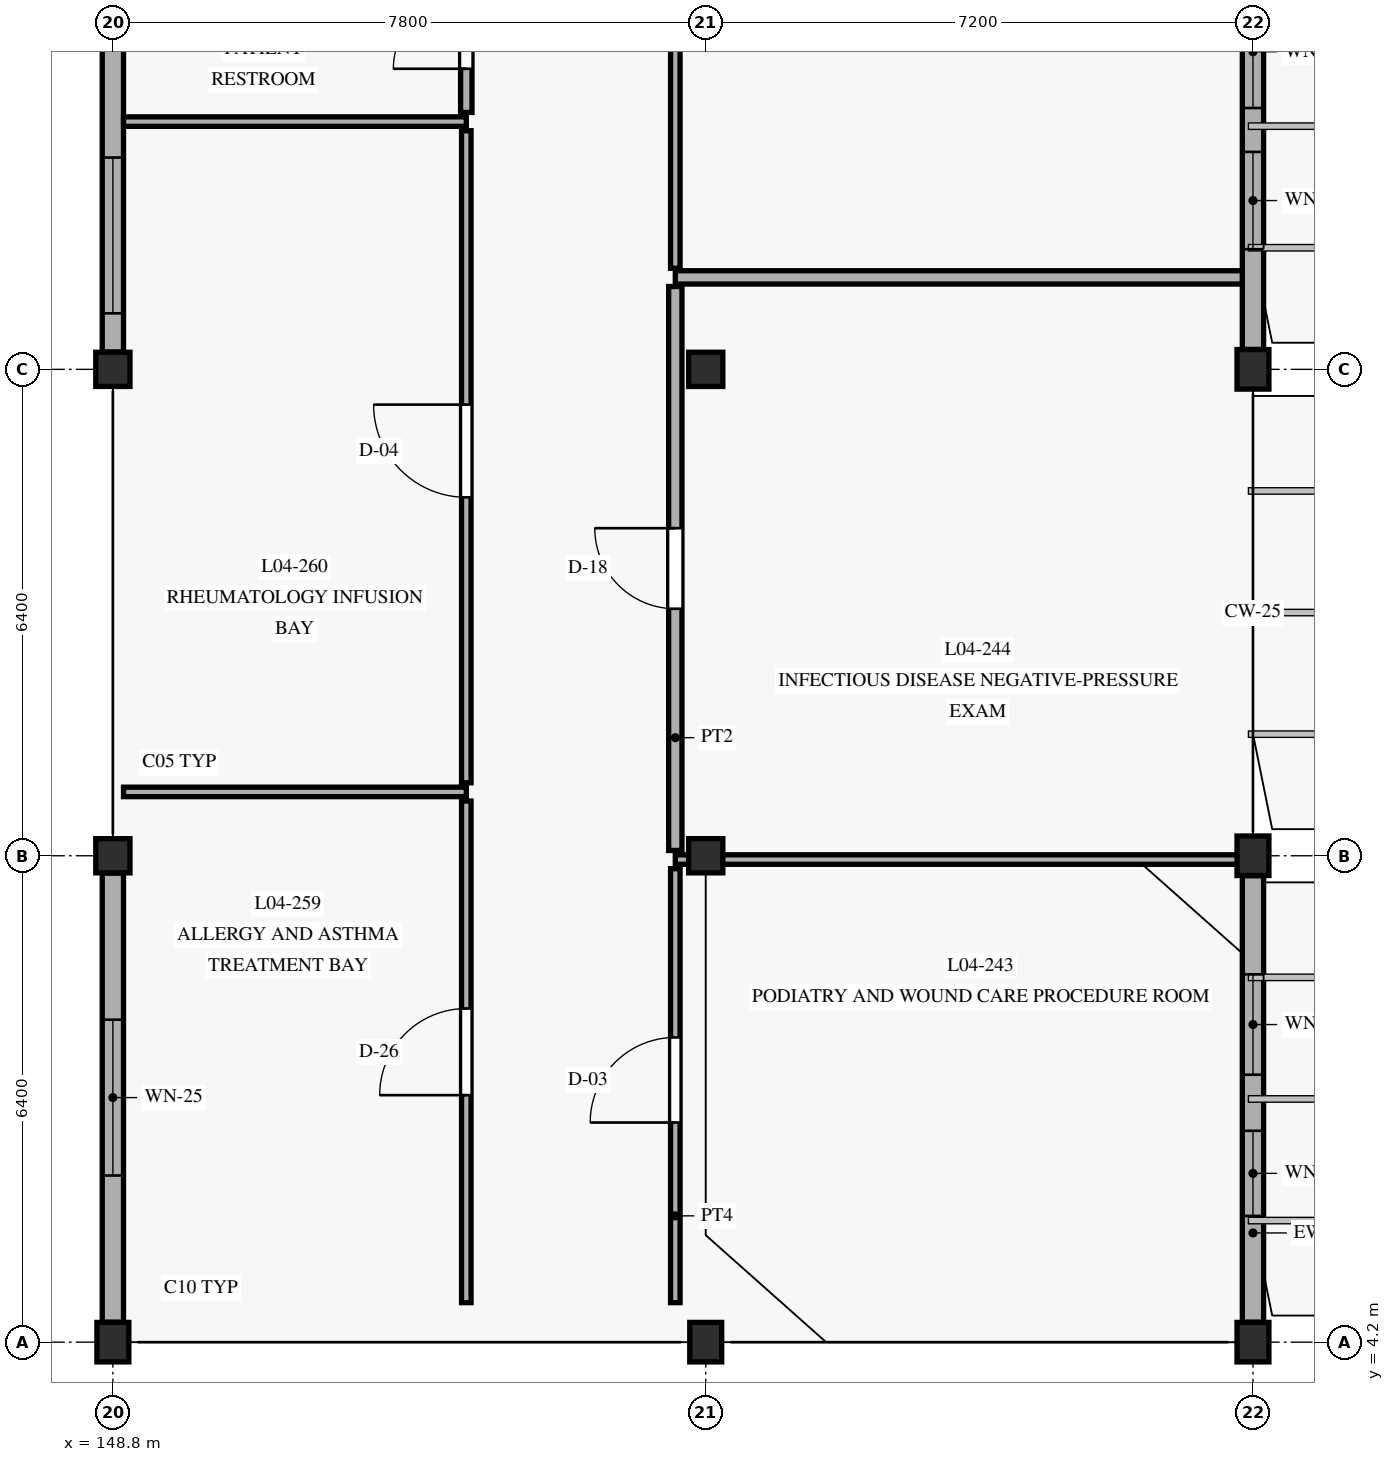
"""IFC4 building model, lengths in metres.
Left out: names, types, materials, properties, quantities, classifications, styles, units other than length and angle.
Written with IfcOpenShell. Run it as: python <this file> out.ifc"""

import sys

from ifc_helpers import new_model, si_unit, direction, frame, frame_2d, origin, origin_with_axes, origin_2d, place, context, subcontext, project, spatial, rectangle, extrude, element, fill, save


model = new_model("IFC4")
c1 = context("Model", 3, precision=1e-05, world=origin(), true_north=direction((0.0, 1.0)))
c2 = subcontext(c1, "Body", "Model", "MODEL_VIEW")
j1 = project(units=[si_unit("LENGTHUNIT", "METRE"), si_unit("PLANEANGLEUNIT", "RADIAN")], contexts=[c1])
p1 = place(None, origin())
s1 = spatial("IfcSite", under=j1, at=p1, CompositionType="ELEMENT")
p2 = place(p1, origin())
s2 = spatial("IfcBuilding", under=s1, at=p2, CompositionType="ELEMENT")
p3 = place(p2, frame((0.0, 0.0, 13.5)))
s3 = spatial("IfcBuildingStorey", under=s2, at=p3, CompositionType="ELEMENT", Elevation=13.5)
p4 = place(p3, frame((148.8, 4.2, 0.0), z_axis=(0.0, 0.0, 1.0), x_axis=(1.0, 0.0, 0.0)))
e1 = element("IfcColumn", 1, at=p4, inside=s3, PredefinedType="COLUMN", context=c2, shape_type="SweptSolid", body=[
    extrude(rectangle(XDim=0.42, YDim=0.52, at=origin_2d()), origin(), (0.0, 0.0, 1.0), 4.05),
])
for number, where, z_axis, x_axis in (
    (2, (148.8, 10.6, 0.0), (0.0, 0.0, 1.0), (1.0, 0.0, 0.0)),
    (3, (148.8, 17.0, 0.0), (0.0, 0.0, 1.0), (1.0, 0.0, 0.0)),
):
    element("IfcColumn", number, at=place(p3, frame(where, z_axis=z_axis, x_axis=x_axis)), inside=s3, PredefinedType="COLUMN", context=c2, shape_type="SweptSolid", body=[
        extrude(rectangle(XDim=0.45, YDim=0.45, at=origin_2d()), origin(), (0.0, 0.0, 1.0), 4.05),
    ])
p5 = place(p3, frame((156.6, 4.2, 0.0), z_axis=(0.0, 0.0, 1.0), x_axis=(1.0, 0.0, 0.0)))
e4 = element("IfcColumn", 4, at=p5, inside=s3, PredefinedType="COLUMN", context=c2, shape_type="SweptSolid", body=[
    extrude(rectangle(XDim=0.42, YDim=0.52, at=origin_2d()), origin(), (0.0, 0.0, 1.0), 4.05),
])
for number, where, z_axis, x_axis in (
    (5, (156.6, 10.6, 0.0), (0.0, 0.0, 1.0), (1.0, 0.0, 0.0)),
    (6, (156.6, 17.0, 0.0), (0.0, 0.0, 1.0), (1.0, 0.0, 0.0)),
):
    element("IfcColumn", number, at=place(p3, frame(where, z_axis=z_axis, x_axis=x_axis)), inside=s3, PredefinedType="COLUMN", context=c2, shape_type="SweptSolid", body=[
        extrude(rectangle(XDim=0.45, YDim=0.45, at=origin_2d()), origin(), (0.0, 0.0, 1.0), 4.05),
    ])
for number, where, z_axis, x_axis in (
    (7, (163.8, 4.2, 0.0), (0.0, 0.0, 1.0), (1.0, 0.0, 0.0)),
    (8, (163.8, 10.6, 0.0), (0.0, 0.0, 1.0), (1.0, 0.0, 0.0)),
    (9, (163.8, 17.0, 0.0), (0.0, 0.0, 1.0), (1.0, 0.0, 0.0)),
):
    element("IfcColumn", number, at=place(p3, frame(where, z_axis=z_axis, x_axis=x_axis)), inside=s3, PredefinedType="COLUMN", context=c2, shape_type="SweptSolid", body=[
        extrude(rectangle(XDim=0.42, YDim=0.52, at=origin_2d()), origin(), (0.0, 0.0, 1.0), 4.05),
    ])
p6 = place(p3, frame((163.8, 4.462, 0.0), z_axis=(0.0, 0.0, 1.0), x_axis=(0.0, 1.0, 0.0)))
e10 = element("IfcWall", 10, at=p6, inside=s3, PredefinedType="SOLIDWALL", context=c2, shape_type="SweptSolid", body=[
    extrude(rectangle(XDim=5.876, YDim=0.28, at=frame_2d((2.938, 0.0))), origin(), (0.0, 0.0, 1.0), 3.42),
])
p7 = place(p6, frame((1.399, 0.0, 0.88)))
e11 = element("IfcOpeningElement", 11, at=p7, cuts=e10, PredefinedType="OPENING", context=c2, shape_type="SweptSolid", body=[
    extrude(rectangle(XDim=1.12, YDim=1.95, at=frame_2d((0.56, 0.975))), frame((0.0, 0.15, 0.0), z_axis=(0.0, -1.0, 0.0), x_axis=(1.0, 0.0, 0.0)), (0.0, 0.0, 1.0), 0.3),
])
p8 = place(p6, frame((3.257, 0.0, 0.88)))
e12 = element("IfcOpeningElement", 12, at=p8, cuts=e10, PredefinedType="OPENING", context=c2, shape_type="SweptSolid", body=[
    extrude(rectangle(XDim=1.32, YDim=2.15, at=frame_2d((0.66, 1.075))), frame((0.0, 0.15, 0.0), z_axis=(0.0, -1.0, 0.0), x_axis=(1.0, 0.0, 0.0)), (0.0, 0.0, 1.0), 0.3),
])
p9 = place(p3, frame((163.8, 17.262, 0.0), z_axis=(0.0, 0.0, 1.0), x_axis=(0.0, 1.0, 0.0)))
e13 = element("IfcWall", 13, at=p9, inside=s3, PredefinedType="SOLIDWALL", context=c2, shape_type="SweptSolid", body=[
    extrude(rectangle(XDim=5.876, YDim=0.28, at=frame_2d((2.938, 0.0))), origin(), (0.0, 0.0, 1.0), 3.42),
])
p10 = place(p9, frame((1.319, 0.0, 0.88)))
e14 = element("IfcOpeningElement", 14, at=p10, cuts=e13, PredefinedType="OPENING", context=c2, shape_type="SweptSolid", body=[
    extrude(rectangle(XDim=1.28, YDim=1.95, at=frame_2d((0.64, 0.975))), frame((0.0, 0.15, 0.0), z_axis=(0.0, -1.0, 0.0), x_axis=(1.0, 0.0, 0.0)), (0.0, 0.0, 1.0), 0.3),
])
p11 = place(p9, frame((3.177, 0.0, 0.88)))
e15 = element("IfcOpeningElement", 15, at=p11, cuts=e13, PredefinedType="OPENING", context=c2, shape_type="SweptSolid", body=[
    extrude(rectangle(XDim=1.48, YDim=2.15, at=frame_2d((0.74, 1.075))), frame((0.0, 0.15, 0.0), z_axis=(0.0, -1.0, 0.0), x_axis=(1.0, 0.0, 0.0)), (0.0, 0.0, 1.0), 0.3),
])
p12 = place(p3, frame((148.8, 10.373, 0.0), z_axis=(0.0, 0.0, 1.0), x_axis=(0.0, -1.0, 0.0)))
e16 = element("IfcWall", 16, at=p12, inside=s3, PredefinedType="SOLIDWALL", context=c2, shape_type="SweptSolid", body=[
    extrude(rectangle(XDim=5.911, YDim=0.28, at=frame_2d((2.956, 0.0))), origin(), (0.0, 0.0, 1.0), 3.39),
])
p13 = place(p12, frame((1.93, 0.0, 0.8)))
e17 = element("IfcOpeningElement", 17, at=p13, cuts=e16, PredefinedType="OPENING", context=c2, shape_type="SweptSolid", body=[
    extrude(rectangle(XDim=2.05, YDim=1.95, at=frame_2d((1.025, 0.975))), frame((0.0, 0.15, 0.0), z_axis=(0.0, -1.0, 0.0), x_axis=(1.0, 0.0, 0.0)), (0.0, 0.0, 1.0), 0.3),
])
p14 = place(p3, frame((148.8, 23.173, 0.0), z_axis=(0.0, 0.0, 1.0), x_axis=(0.0, -1.0, 0.0)))
e18 = element("IfcWall", 18, at=p14, inside=s3, PredefinedType="SOLIDWALL", context=c2, shape_type="SweptSolid", body=[
    extrude(rectangle(XDim=5.946, YDim=0.28, at=frame_2d((2.973, 0.0))), origin(), (0.0, 0.0, 1.0), 3.39),
])
p15 = place(p14, frame((3.386, 0.0, 0.8)))
e19 = element("IfcOpeningElement", 19, at=p15, cuts=e18, PredefinedType="OPENING", context=c2, shape_type="SweptSolid", body=[
    extrude(rectangle(XDim=2.05, YDim=1.95, at=frame_2d((1.025, 0.975))), frame((0.0, 0.15, 0.0), z_axis=(0.0, -1.0, 0.0), x_axis=(1.0, 0.0, 0.0)), (0.0, 0.0, 1.0), 0.3),
])
p16 = place(p3, frame((156.2, 4.72, 0.0), z_axis=(0.0, 0.0, 1.0), x_axis=(0.0, 1.0, 0.0)))
e20 = element("IfcWall", 20, at=p16, inside=s3, PredefinedType="PARTITIONING", context=c2, shape_type="SweptSolid", body=[
    extrude(rectangle(XDim=5.71, YDim=0.125, at=frame_2d((2.855, 0.0))), origin(), (0.0, 0.0, 1.0), 3.365),
])
p17 = place(p16, frame((2.37, 0.0, 0.0)))
e21 = element("IfcOpeningElement", 21, at=p17, cuts=e20, PredefinedType="OPENING", context=c2, shape_type="SweptSolid", body=[
    extrude(rectangle(XDim=1.12, YDim=2.2, at=frame_2d((0.56, 1.1))), frame((0.0, 0.073, 0.0), z_axis=(0.0, -1.0, 0.0), x_axis=(1.0, 0.0, 0.0)), (0.0, 0.0, 1.0), 0.145),
])
p18 = place(p3, frame((156.2, 10.55, 0.0), z_axis=(0.0, 0.0, 1.0), x_axis=(1.0, 0.0, 0.0)))
e22 = element("IfcWall", 22, at=p18, inside=s3, PredefinedType="PARTITIONING", context=c2, shape_type="SweptSolid", body=[
    extrude(rectangle(XDim=7.46, YDim=0.125, at=frame_2d((3.73, 0.0))), origin(), (0.0, 0.0, 1.0), 3.365),
])
p19 = place(p3, frame((156.2, 10.67, 0.0), z_axis=(0.0, 0.0, 1.0), x_axis=(0.0, 1.0, 0.0)))
e23 = element("IfcWall", 23, at=p19, inside=s3, PredefinedType="PARTITIONING", context=c2, shape_type="SweptSolid", body=[
    extrude(rectangle(XDim=7.42, YDim=0.175, at=frame_2d((3.71, 0.0))), origin(), (0.0, 0.0, 1.0), 3.365),
])
p20 = place(p19, frame((3.18, 0.0, 0.0)))
e24 = element("IfcOpeningElement", 24, at=p20, cuts=e23, PredefinedType="OPENING", context=c2, shape_type="SweptSolid", body=[
    extrude(rectangle(XDim=1.06, YDim=2.2, at=frame_2d((0.53, 1.1))), frame((0.0, 0.098, 0.0), z_axis=(0.0, -1.0, 0.0), x_axis=(1.0, 0.0, 0.0)), (0.0, 0.0, 1.0), 0.195),
])
p21 = place(p3, frame((156.2, 18.21, 0.0), z_axis=(0.0, 0.0, 1.0), x_axis=(1.0, 0.0, 0.0)))
e25 = element("IfcWall", 25, at=p21, inside=s3, PredefinedType="PARTITIONING", context=c2, shape_type="SweptSolid", body=[
    extrude(rectangle(XDim=7.46, YDim=0.175, at=frame_2d((3.73, 0.0))), origin(), (0.0, 0.0, 1.0), 3.385),
])
p22 = place(p3, frame((156.2, 18.33, 0.0), z_axis=(0.0, 0.0, 1.0), x_axis=(0.0, 1.0, 0.0)))
e26 = element("IfcWall", 26, at=p22, inside=s3, PredefinedType="PARTITIONING", context=c2, shape_type="SweptSolid", body=[
    extrude(rectangle(XDim=8.21, YDim=0.125, at=frame_2d((4.105, 0.0))), origin(), (0.0, 0.0, 1.0), 3.365),
])
p23 = place(p22, frame((3.269, 0.0, 0.0)))
e27 = element("IfcOpeningElement", 27, at=p23, cuts=e26, PredefinedType="OPENING", context=c2, shape_type="SweptSolid", body=[
    extrude(rectangle(XDim=0.92, YDim=2.15, at=frame_2d((0.46, 1.075))), frame((0.0, 0.073, 0.0), z_axis=(0.0, -1.0, 0.0), x_axis=(1.0, 0.0, 0.0)), (0.0, 0.0, 1.0), 0.145),
])
p24 = place(p3, frame((153.45, 4.72, 0.0), z_axis=(0.0, 0.0, 1.0), x_axis=(0.0, 1.0, 0.0)))
e28 = element("IfcWall", 28, at=p24, inside=s3, PredefinedType="PARTITIONING", context=c2, shape_type="SweptSolid", body=[
    extrude(rectangle(XDim=6.6, YDim=0.125, at=frame_2d((3.3, 0.0))), origin(), (0.0, 0.0, 1.0), 3.365),
])
p25 = place(p24, frame((2.73, 0.0, 0.0)))
e29 = element("IfcOpeningElement", 29, at=p25, cuts=e28, PredefinedType="OPENING", context=c2, shape_type="SweptSolid", body=[
    extrude(rectangle(XDim=1.14, YDim=2.22, at=frame_2d((0.57, 1.11))), frame((0.0, 0.073, 0.0), z_axis=(0.0, -1.0, 0.0), x_axis=(1.0, 0.0, 0.0)), (0.0, 0.0, 1.0), 0.145),
])
p26 = place(p3, frame((148.94, 11.44, 0.0), z_axis=(0.0, 0.0, 1.0), x_axis=(1.0, 0.0, 0.0)))
e30 = element("IfcWall", 30, at=p26, inside=s3, PredefinedType="PARTITIONING", context=c2, shape_type="SweptSolid", body=[
    extrude(rectangle(XDim=4.51, YDim=0.125, at=frame_2d((2.255, 0.0))), origin(), (0.0, 0.0, 1.0), 3.385),
])
p27 = place(p3, frame((153.45, 11.56, 0.0), z_axis=(0.0, 0.0, 1.0), x_axis=(0.0, 1.0, 0.0)))
e31 = element("IfcWall", 31, at=p27, inside=s3, PredefinedType="PARTITIONING", context=c2, shape_type="SweptSolid", body=[
    extrude(rectangle(XDim=8.58, YDim=0.125, at=frame_2d((4.29, 0.0))), origin(), (0.0, 0.0, 1.0), 3.365),
])
p28 = place(p27, frame((3.756, 0.0, 0.0)))
e32 = element("IfcOpeningElement", 32, at=p28, cuts=e31, PredefinedType="OPENING", context=c2, shape_type="SweptSolid", body=[
    extrude(rectangle(XDim=1.22, YDim=2.2, at=frame_2d((0.61, 1.1))), frame((0.0, 0.073, 0.0), z_axis=(0.0, -1.0, 0.0), x_axis=(1.0, 0.0, 0.0)), (0.0, 0.0, 1.0), 0.145),
])
p29 = place(p3, frame((148.94, 20.26, 0.0), z_axis=(0.0, 0.0, 1.0), x_axis=(1.0, 0.0, 0.0)))
e33 = element("IfcWall", 33, at=p29, inside=s3, PredefinedType="PARTITIONING", context=c2, shape_type="SweptSolid", body=[
    extrude(rectangle(XDim=4.51, YDim=0.125, at=frame_2d((2.255, 0.0))), origin(), (0.0, 0.0, 1.0), 3.385),
])
p30 = place(p3, frame((153.45, 20.38, 0.0), z_axis=(0.0, 0.0, 1.0), x_axis=(0.0, 1.0, 0.0)))
e34 = element("IfcWall", 34, at=p30, inside=s3, PredefinedType="PARTITIONING", context=c2, shape_type="SweptSolid", body=[
    extrude(rectangle(XDim=2.11, YDim=0.15, at=frame_2d((1.055, 0.0))), origin(), (0.0, 0.0, 1.0), 3.765),
])
p31 = place(p30, frame((0.575, 0.0, 0.0)))
e35 = element("IfcOpeningElement", 35, at=p31, cuts=e34, PredefinedType="OPENING", context=c2, shape_type="SweptSolid", body=[
    extrude(rectangle(XDim=0.96, YDim=2.1, at=frame_2d((0.48, 1.05))), frame((0.0, 0.085, 0.0), z_axis=(0.0, -1.0, 0.0), x_axis=(1.0, 0.0, 0.0)), (0.0, 0.0, 1.0), 0.17),
])
p32 = place(p7, origin_with_axes())
e36 = element("IfcWindow", 36, at=p32, inside=s3, PartitioningType="SINGLE_PANEL", PredefinedType="WINDOW", context=c2, shape_type="SweptSolid", body=[
    extrude(rectangle(XDim=1.12, YDim=1.95, at=frame_2d((0.56, 0.975))), frame((0.0, 0.03, 0.0), z_axis=(0.0, -1.0, 0.0), x_axis=(1.0, 0.0, 0.0)), (0.0, 0.0, 1.0), 0.06),
])
fill(e11, e36)
p33 = place(p8, origin_with_axes())
e37 = element("IfcWindow", 37, at=p33, inside=s3, PartitioningType="SINGLE_PANEL", PredefinedType="WINDOW", context=c2, shape_type="SweptSolid", body=[
    extrude(rectangle(XDim=1.32, YDim=2.15, at=frame_2d((0.66, 1.075))), frame((0.0, 0.03, 0.0), z_axis=(0.0, -1.0, 0.0), x_axis=(1.0, 0.0, 0.0)), (0.0, 0.0, 1.0), 0.06),
])
fill(e12, e37)
p34 = place(p10, origin_with_axes())
e38 = element("IfcWindow", 38, at=p34, inside=s3, PartitioningType="SINGLE_PANEL", PredefinedType="WINDOW", context=c2, shape_type="SweptSolid", body=[
    extrude(rectangle(XDim=1.28, YDim=1.95, at=frame_2d((0.64, 0.975))), frame((0.0, 0.03, 0.0), z_axis=(0.0, -1.0, 0.0), x_axis=(1.0, 0.0, 0.0)), (0.0, 0.0, 1.0), 0.06),
])
fill(e14, e38)
p35 = place(p11, origin_with_axes())
e39 = element("IfcWindow", 39, at=p35, inside=s3, PartitioningType="SINGLE_PANEL", PredefinedType="WINDOW", context=c2, shape_type="SweptSolid", body=[
    extrude(rectangle(XDim=1.48, YDim=2.15, at=frame_2d((0.74, 1.075))), frame((0.0, 0.03, 0.0), z_axis=(0.0, -1.0, 0.0), x_axis=(1.0, 0.0, 0.0)), (0.0, 0.0, 1.0), 0.06),
])
fill(e15, e39)
p36 = place(p13, origin_with_axes())
e40 = element("IfcWindow", 40, at=p36, inside=s3, PartitioningType="SINGLE_PANEL", PredefinedType="WINDOW", context=c2, shape_type="SweptSolid", body=[
    extrude(rectangle(XDim=2.05, YDim=1.95, at=frame_2d((1.025, 0.975))), frame((0.0, 0.03, 0.0), z_axis=(0.0, -1.0, 0.0), x_axis=(1.0, 0.0, 0.0)), (0.0, 0.0, 1.0), 0.06),
])
fill(e17, e40)
p37 = place(p15, origin_with_axes())
e41 = element("IfcWindow", 41, at=p37, inside=s3, PartitioningType="SINGLE_PANEL", PredefinedType="WINDOW", context=c2, shape_type="SweptSolid", body=[
    extrude(rectangle(XDim=2.05, YDim=1.95, at=frame_2d((1.025, 0.975))), frame((0.0, 0.03, 0.0), z_axis=(0.0, -1.0, 0.0), x_axis=(1.0, 0.0, 0.0)), (0.0, 0.0, 1.0), 0.06),
])
fill(e19, e41)
p38 = place(p17, frame((1.12, 0.0, 0.0), z_axis=(0.0, 0.0, 1.0), x_axis=(-1.0, 0.0, 0.0)))
e42 = element("IfcDoor", 42, at=p38, inside=s3, OperationType="SINGLE_SWING_RIGHT", PredefinedType="DOOR", context=c2, shape_type="SweptSolid", body=[
    extrude(rectangle(XDim=1.12, YDim=2.2, at=frame_2d((0.56, 1.1))), frame((0.0, 0.025, 0.0), z_axis=(0.0, -1.0, 0.0), x_axis=(1.0, 0.0, 0.0)), (0.0, 0.0, 1.0), 0.05),
])
fill(e21, e42)
p39 = place(p20, frame((1.06, 0.0, 0.0), z_axis=(0.0, 0.0, 1.0), x_axis=(-1.0, 0.0, 0.0)))
e43 = element("IfcDoor", 43, at=p39, inside=s3, OperationType="SINGLE_SWING_LEFT", PredefinedType="DOOR", context=c2, shape_type="SweptSolid", body=[
    extrude(rectangle(XDim=1.06, YDim=2.2, at=frame_2d((0.53, 1.1))), frame((0.0, 0.025, 0.0), z_axis=(0.0, -1.0, 0.0), x_axis=(1.0, 0.0, 0.0)), (0.0, 0.0, 1.0), 0.05),
])
fill(e24, e43)
p40 = place(p25, origin_with_axes())
e44 = element("IfcDoor", 44, at=p40, inside=s3, OperationType="SINGLE_SWING_LEFT", PredefinedType="DOOR", context=c2, shape_type="SweptSolid", body=[
    extrude(rectangle(XDim=1.14, YDim=2.22, at=frame_2d((0.57, 1.11))), frame((0.0, 0.025, 0.0), z_axis=(0.0, -1.0, 0.0), x_axis=(1.0, 0.0, 0.0)), (0.0, 0.0, 1.0), 0.05),
])
fill(e29, e44)
p41 = place(p28, origin_with_axes())
e45 = element("IfcDoor", 45, at=p41, inside=s3, OperationType="SINGLE_SWING_RIGHT", PredefinedType="DOOR", context=c2, shape_type="SweptSolid", body=[
    extrude(rectangle(XDim=1.22, YDim=2.2, at=frame_2d((0.61, 1.1))), frame((0.0, 0.025, 0.0), z_axis=(0.0, -1.0, 0.0), x_axis=(1.0, 0.0, 0.0)), (0.0, 0.0, 1.0), 0.05),
])
fill(e32, e45)
p42 = place(p31, origin_with_axes())
e46 = element("IfcDoor", 46, at=p42, inside=s3, OperationType="SINGLE_SWING_LEFT", PredefinedType="DOOR", context=c2, shape_type="SweptSolid", body=[
    extrude(rectangle(XDim=0.96, YDim=2.1, at=frame_2d((0.48, 1.05))), frame((0.0, 0.025, 0.0), z_axis=(0.0, -1.0, 0.0), x_axis=(1.0, 0.0, 0.0)), (0.0, 0.0, 1.0), 0.05),
])
fill(e35, e46)
save(model, sys.argv[1])
